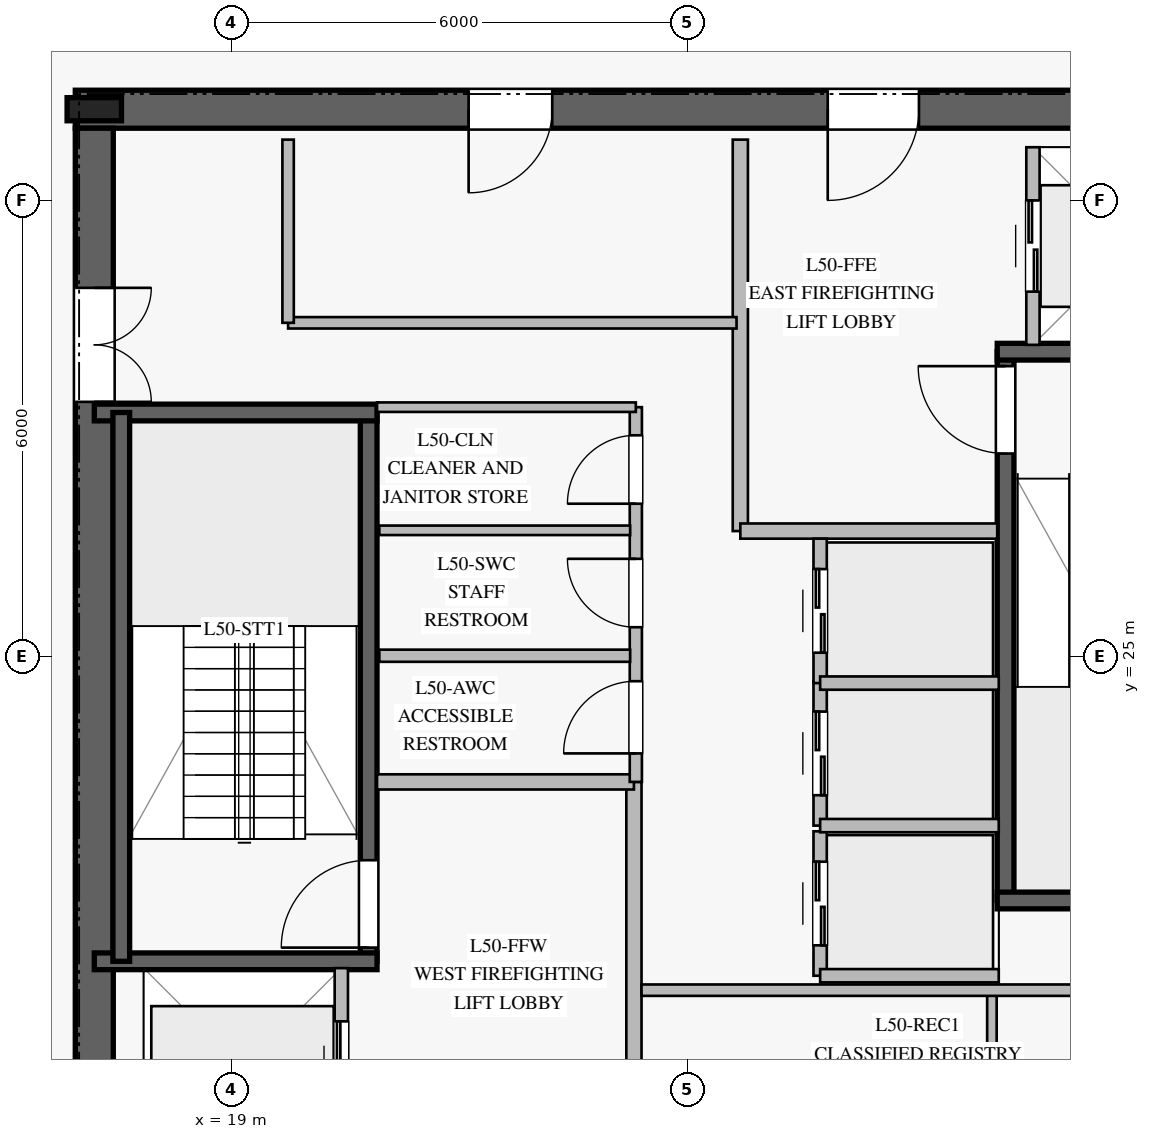
"""IFC4 building model, lengths in metres.
Left out: names, types, materials, properties, quantities, classifications, styles, units other than length and angle.
Written with IfcOpenShell. Run it as: python <this file> out.ifc"""

import sys

from ifc_helpers import new_model, si_unit, direction, frame, frame_2d, origin, origin_2d, place, context, subcontext, project, spatial, rectangle, i_section, extrude, element, fill, save


model = new_model("IFC4")
c1 = context("Model", 3, precision=1e-05, world=origin(), true_north=direction((0.0, 1.0)))
c2 = subcontext(c1, "Body", "Model", "MODEL_VIEW")
j1 = project(units=[si_unit("LENGTHUNIT", "METRE"), si_unit("PLANEANGLEUNIT", "RADIAN")], contexts=[c1])
p1 = place(None, origin())
s1 = spatial("IfcSite", under=j1, at=p1, CompositionType="ELEMENT")
p2 = place(p1, origin())
s2 = spatial("IfcBuilding", under=s1, at=p2, CompositionType="ELEMENT")
p3 = place(p2, frame((0.0, 0.0, 208.8)))
s3 = spatial("IfcBuildingStorey", under=s2, at=p3, CompositionType="ELEMENT", Elevation=208.8)
p4 = place(p3, frame((33.05, 32.2, 0.0), z_axis=(0.0, 0.0, 1.0), x_axis=(-1.0, 0.0, 0.0)))
e1 = element("IfcWall", 1, at=p4, inside=s3, PredefinedType="SHEAR", context=c2, shape_type="SweptSolid", body=[
    extrude(rectangle(XDim=16.1, YDim=0.5, at=frame_2d((8.05, 0.0))), origin(), (0.0, 0.0, 1.0), 3.78),
])
p5 = place(p4, frame((5.0, 0.0, 0.0)))
e2 = element("IfcOpeningElement", 2, at=p5, cuts=e1, PredefinedType="OPENING", context=c2, shape_type="SweptSolid", body=[
    extrude(rectangle(XDim=1.2, YDim=2.25, at=frame_2d((0.6, 1.125))), frame((0.0, 0.26, 0.0), z_axis=(0.0, -1.0, 0.0), x_axis=(1.0, 0.0, 0.0)), (0.0, 0.0, 1.0), 0.52),
])
p6 = place(p4, frame((9.825, 0.0, 0.0)))
e3 = element("IfcOpeningElement", 3, at=p6, cuts=e1, PredefinedType="OPENING", context=c2, shape_type="SweptSolid", body=[
    extrude(rectangle(XDim=1.1, YDim=2.2, at=frame_2d((0.55, 1.1))), frame((0.0, 0.26, 0.0), z_axis=(0.0, -1.0, 0.0), x_axis=(1.0, 0.0, 0.0)), (0.0, 0.0, 1.0), 0.52),
])
p7 = place(p3, frame((17.2, 31.95, 0.0), z_axis=(0.0, 0.0, 1.0), x_axis=(0.0, -1.0, 0.0)))
e4 = element("IfcWall", 4, at=p7, inside=s3, PredefinedType="SHEAR", context=c2, shape_type="SweptSolid", body=[
    extrude(rectangle(XDim=13.9, YDim=0.5, at=frame_2d((6.95, 0.0))), origin(), (0.0, 0.0, 1.0), 3.78),
])
p8 = place(p7, frame((2.1, 0.0, 0.0)))
e5 = element("IfcOpeningElement", 5, at=p8, cuts=e4, PredefinedType="OPENING", context=c2, shape_type="SweptSolid", body=[
    extrude(rectangle(XDim=1.5, YDim=2.2, at=frame_2d((0.75, 1.1))), frame((0.0, 0.26, 0.0), z_axis=(0.0, -1.0, 0.0), x_axis=(1.0, 0.0, 0.0)), (0.0, 0.0, 1.0), 0.52),
])
p9 = place(p3, frame((17.2, 32.2, 0.0), z_axis=(0.0, 0.0, 1.0), x_axis=(1.0, 0.0, 0.0)))
e6 = element("IfcColumn", 6, at=p9, inside=s3, PredefinedType="COLUMN", context=c2, shape_type="SweptSolid", body=[
    extrude(i_section(OverallWidth=0.304, OverallDepth=0.716, WebThickness=0.021, FlangeThickness=0.04, at=origin_2d()), origin(), (0.0, 0.0, 1.0), 4.0),
])
p10 = place(p3, frame((20.81, 20.99, 0.0), z_axis=(0.0, 0.0, 1.0), x_axis=(0.0, 1.0, 0.0)))
e7 = element("IfcWall", 7, at=p10, inside=s3, PredefinedType="SOLIDWALL", context=c2, shape_type="SweptSolid", body=[
    extrude(rectangle(XDim=7.22, YDim=0.22, at=frame_2d((3.61, 0.0))), origin(), (0.0, 0.0, 1.0), 3.78),
])
p11 = place(p10, frame((0.18, 0.0, 0.0)))
e8 = element("IfcOpeningElement", 8, at=p11, cuts=e7, PredefinedType="OPENING", context=c2, shape_type="SweptSolid", body=[
    extrude(rectangle(XDim=1.15, YDim=2.2, at=frame_2d((0.575, 1.1))), frame((0.0, 0.12, 0.0), z_axis=(0.0, -1.0, 0.0), x_axis=(1.0, 0.0, 0.0)), (0.0, 0.0, 1.0), 0.24),
])
for number, where, z_axis, x_axis in (
    (9, (17.2, 20.99, 0.0), (0.0, 0.0, 1.0), (1.0, 0.0, 0.0)),
    (10, (17.2, 28.21, 0.0), (0.0, 0.0, 1.0), (1.0, 0.0, 0.0)),
):
    element("IfcWall", number, at=place(p3, frame(where, z_axis=z_axis, x_axis=x_axis)), inside=s3, PredefinedType="SOLIDWALL", context=c2, shape_type="SweptSolid", body=[
        extrude(rectangle(XDim=3.72, YDim=0.22, at=frame_2d((1.86, 0.0))), origin(), (0.0, 0.0, 1.0), 3.78),
    ])
p12 = place(p3, frame((17.555, 28.21, 0.0), z_axis=(0.0, 0.0, 1.0), x_axis=(0.0, -1.0, 0.0)))
e11 = element("IfcWall", 11, at=p12, inside=s3, PredefinedType="SOLIDWALL", context=c2, shape_type="SweptSolid", body=[
    extrude(rectangle(XDim=7.22, YDim=0.22, at=frame_2d((3.61, 0.0))), origin(), (0.0, 0.0, 1.0), 3.78),
])
p13 = place(p3, frame((29.19, 21.79, 0.0), z_axis=(0.0, 0.0, 1.0), x_axis=(0.0, 1.0, 0.0)))
e12 = element("IfcWall", 12, at=p13, inside=s3, PredefinedType="SOLIDWALL", context=c2, shape_type="SweptSolid", body=[
    extrude(rectangle(XDim=7.22, YDim=0.22, at=frame_2d((3.61, 0.0))), origin(), (0.0, 0.0, 1.0), 3.78),
])
p14 = place(p13, frame((5.88, 0.0, 0.0)))
e13 = element("IfcOpeningElement", 13, at=p14, cuts=e12, PredefinedType="OPENING", context=c2, shape_type="SweptSolid", body=[
    extrude(rectangle(XDim=1.15, YDim=2.2, at=frame_2d((0.575, 1.1))), frame((0.0, 0.12, 0.0), z_axis=(0.0, -1.0, 0.0), x_axis=(1.0, 0.0, 0.0)), (0.0, 0.0, 1.0), 0.24),
])
for number, where, z_axis, x_axis in (
    (14, (29.08, 21.79, 0.0), (0.0, 0.0, 1.0), (1.0, 0.0, 0.0)),
    (15, (29.08, 29.01, 0.0), (0.0, 0.0, 1.0), (1.0, 0.0, 0.0)),
):
    element("IfcWall", number, at=place(p3, frame(where, z_axis=z_axis, x_axis=x_axis)), inside=s3, PredefinedType="SOLIDWALL", context=c2, shape_type="SweptSolid", body=[
        extrude(rectangle(XDim=3.72, YDim=0.22, at=frame_2d((1.86, 0.0))), origin(), (0.0, 0.0, 1.0), 3.78),
    ])
p15 = place(p3, frame((24.3, 18.2, 0.0), z_axis=(0.0, 0.0, 1.0), x_axis=(0.0, 1.0, 0.0)))
e16 = element("IfcWall", 16, at=p15, inside=s3, PredefinedType="PARTITIONING", context=c2, shape_type="SweptSolid", body=[
    extrude(rectangle(XDim=5.15, YDim=0.2, at=frame_2d((2.575, 0.0))), origin(), (0.0, 0.0, 1.0), 3.78),
])
p16 = place(p3, frame((20.92, 23.35, 0.0), z_axis=(0.0, 0.0, 1.0), x_axis=(1.0, 0.0, 0.0)))
e17 = element("IfcWall", 17, at=p16, inside=s3, PredefinedType="PARTITIONING", context=c2, shape_type="SweptSolid", body=[
    extrude(rectangle(XDim=3.38, YDim=0.2, at=frame_2d((1.69, 0.0))), origin(), (0.0, 0.0, 1.0), 3.78),
])
p17 = place(p3, frame((25.7, 26.65, 0.0), z_axis=(0.0, 0.0, 1.0), x_axis=(0.0, 1.0, 0.0)))
e18 = element("IfcWall", 18, at=p17, inside=s3, PredefinedType="PARTITIONING", context=c2, shape_type="SweptSolid", body=[
    extrude(rectangle(XDim=5.15, YDim=0.2, at=frame_2d((2.575, 0.0))), origin(), (0.0, 0.0, 1.0), 3.78),
])
p18 = place(p3, frame((25.7, 26.65, 0.0), z_axis=(0.0, 0.0, 1.0), x_axis=(1.0, 0.0, 0.0)))
e19 = element("IfcWall", 19, at=p18, inside=s3, PredefinedType="PARTITIONING", context=c2, shape_type="SweptSolid", body=[
    extrude(rectangle(XDim=3.38, YDim=0.2, at=frame_2d((1.69, 0.0))), origin(), (0.0, 0.0, 1.0), 3.78),
])
p19 = place(p3, frame((24.325, 23.35, 0.0), z_axis=(0.0, 0.0, 1.0), x_axis=(0.0, 1.0, 0.0)))
e20 = element("IfcWall", 20, at=p19, inside=s3, PredefinedType="PLUMBINGWALL", context=c2, shape_type="SweptSolid", body=[
    extrude(rectangle(XDim=4.93, YDim=0.16, at=frame_2d((2.465, 0.0))), origin(), (0.0, 0.0, 1.0), 3.78),
])
p20 = place(p19, frame((0.375, 0.0, 0.0)))
e21 = element("IfcOpeningElement", 21, at=p20, cuts=e20, PredefinedType="OPENING", context=c2, shape_type="SweptSolid", body=[
    extrude(rectangle(XDim=0.95, YDim=2.1, at=frame_2d((0.475, 1.05))), frame((0.0, 0.09, 0.0), z_axis=(0.0, -1.0, 0.0), x_axis=(1.0, 0.0, 0.0)), (0.0, 0.0, 1.0), 0.18),
])
p21 = place(p19, frame((2.035, 0.0, 0.0)))
e22 = element("IfcOpeningElement", 22, at=p21, cuts=e20, PredefinedType="OPENING", context=c2, shape_type="SweptSolid", body=[
    extrude(rectangle(XDim=0.9, YDim=2.1, at=frame_2d((0.45, 1.05))), frame((0.0, 0.09, 0.0), z_axis=(0.0, -1.0, 0.0), x_axis=(1.0, 0.0, 0.0)), (0.0, 0.0, 1.0), 0.18),
])
p22 = place(p19, frame((3.66, 0.0, 0.0)))
e23 = element("IfcOpeningElement", 23, at=p22, cuts=e20, PredefinedType="OPENING", context=c2, shape_type="SweptSolid", body=[
    extrude(rectangle(XDim=0.9, YDim=2.1, at=frame_2d((0.45, 1.05))), frame((0.0, 0.09, 0.0), z_axis=(0.0, -1.0, 0.0), x_axis=(1.0, 0.0, 0.0)), (0.0, 0.0, 1.0), 0.18),
])
p23 = place(p3, frame((20.92, 28.28, 0.0), z_axis=(0.0, 0.0, 1.0), x_axis=(1.0, 0.0, 0.0)))
e24 = element("IfcWall", 24, at=p23, inside=s3, PredefinedType="PARTITIONING", context=c2, shape_type="SweptSolid", body=[
    extrude(rectangle(XDim=3.405, YDim=0.125, at=frame_2d((1.703, 0.0))), origin(), (0.0, 0.0, 1.0), 3.78),
])
p24 = place(p3, frame((29.01, 18.05, 0.0), z_axis=(0.0, 0.0, 1.0), x_axis=(0.0, 1.0, 0.0)))
e25 = element("IfcWall", 25, at=p24, inside=s3, PredefinedType="PARTITIONING", context=c2, shape_type="SweptSolid", body=[
    extrude(rectangle(XDim=2.5, YDim=0.125, at=frame_2d((1.25, 0.0))), origin(), (0.0, 0.0, 1.0), 3.78),
])
p25 = place(p3, frame((20.95, 25.01, 0.0), z_axis=(0.0, 0.0, 1.0), x_axis=(1.0, 0.0, 0.0)))
e26 = element("IfcWall", 26, at=p25, inside=s3, PredefinedType="PLUMBINGWALL", context=c2, shape_type="SweptSolid", body=[
    extrude(rectangle(XDim=3.3, YDim=0.16, at=frame_2d((1.65, 0.0))), origin(), (0.0, 0.0, 1.0), 3.78),
])
p26 = place(p3, frame((20.95, 26.66, 0.0), z_axis=(0.0, 0.0, 1.0), x_axis=(1.0, 0.0, 0.0)))
e27 = element("IfcWall", 27, at=p26, inside=s3, PredefinedType="PARTITIONING", context=c2, shape_type="SweptSolid", body=[
    extrude(rectangle(XDim=3.3, YDim=0.125, at=frame_2d((1.65, 0.0))), origin(), (0.0, 0.0, 1.0), 3.78),
])
p27 = place(p3, frame((24.4, 20.61, 0.0), z_axis=(0.0, 0.0, 1.0), x_axis=(1.0, 0.0, 0.0)))
e28 = element("IfcWall", 28, at=p27, inside=s3, PredefinedType="PARTITIONING", context=c2, shape_type="SweptSolid", body=[
    extrude(rectangle(XDim=5.9, YDim=0.15, at=frame_2d((2.95, 0.0))), origin(), (0.0, 0.0, 1.0), 3.78),
])
p28 = place(p3, frame((19.75, 29.39, 0.0), z_axis=(0.0, 0.0, 1.0), x_axis=(1.0, 0.0, 0.0)))
e29 = element("IfcWall", 29, at=p28, inside=s3, PredefinedType="PARTITIONING", context=c2, shape_type="SweptSolid", body=[
    extrude(rectangle(XDim=5.9, YDim=0.15, at=frame_2d((2.95, 0.0))), origin(), (0.0, 0.0, 1.0), 3.78),
])
p29 = place(p3, frame((19.75, 29.39, 0.0), z_axis=(0.0, 0.0, 1.0), x_axis=(0.0, 1.0, 0.0)))
e30 = element("IfcWall", 30, at=p29, inside=s3, PredefinedType="PARTITIONING", context=c2, shape_type="SweptSolid", body=[
    extrude(rectangle(XDim=2.41, YDim=0.15, at=frame_2d((1.205, 0.0))), origin(), (0.0, 0.0, 1.0), 3.78),
])
p30 = place(p3, frame((26.75, 20.8, 0.0), z_axis=(0.0, 0.0, 1.0), x_axis=(0.0, 1.0, 0.0)))
e31 = element("IfcWall", 31, at=p30, inside=s3, PredefinedType="PARTITIONING", context=c2, shape_type="SweptSolid", body=[
    extrude(rectangle(XDim=1.9, YDim=0.175, at=frame_2d((0.95, 0.0))), origin(), (0.0, 0.0, 1.0), 3.78),
])
p31 = place(p30, frame((0.4, 0.0, 0.0)))
e32 = element("IfcOpeningElement", 32, at=p31, cuts=e31, PredefinedType="OPENING", context=c2, shape_type="SweptSolid", body=[
    extrude(rectangle(XDim=1.1, YDim=2.2, at=frame_2d((0.55, 1.1))), frame((0.0, 0.098, 0.0), z_axis=(0.0, -1.0, 0.0), x_axis=(1.0, 0.0, 0.0)), (0.0, 0.0, 1.0), 0.195),
])
p32 = place(p3, frame((26.75, 20.8, 0.0), z_axis=(0.0, 0.0, 1.0), x_axis=(1.0, 0.0, 0.0)))
e33 = element("IfcWall", 33, at=p32, inside=s3, PredefinedType="PARTITIONING", context=c2, shape_type="SweptSolid", body=[
    extrude(rectangle(XDim=2.35, YDim=0.175, at=frame_2d((1.175, 0.0))), origin(), (0.0, 0.0, 1.0), 3.78),
])
p33 = place(p3, frame((26.75, 22.775, 0.0), z_axis=(0.0, 0.0, 1.0), x_axis=(0.0, 1.0, 0.0)))
e34 = element("IfcWall", 34, at=p33, inside=s3, PredefinedType="PARTITIONING", context=c2, shape_type="SweptSolid", body=[
    extrude(rectangle(XDim=1.9, YDim=0.175, at=frame_2d((0.95, 0.0))), origin(), (0.0, 0.0, 1.0), 3.78),
])
p34 = place(p33, frame((0.4, 0.0, 0.0)))
e35 = element("IfcOpeningElement", 35, at=p34, cuts=e34, PredefinedType="OPENING", context=c2, shape_type="SweptSolid", body=[
    extrude(rectangle(XDim=1.1, YDim=2.2, at=frame_2d((0.55, 1.1))), frame((0.0, 0.098, 0.0), z_axis=(0.0, -1.0, 0.0), x_axis=(1.0, 0.0, 0.0)), (0.0, 0.0, 1.0), 0.195),
])
p35 = place(p3, frame((26.75, 22.775, 0.0), z_axis=(0.0, 0.0, 1.0), x_axis=(1.0, 0.0, 0.0)))
e36 = element("IfcWall", 36, at=p35, inside=s3, PredefinedType="PARTITIONING", context=c2, shape_type="SweptSolid", body=[
    extrude(rectangle(XDim=2.35, YDim=0.175, at=frame_2d((1.175, 0.0))), origin(), (0.0, 0.0, 1.0), 3.78),
])
p36 = place(p3, frame((26.75, 24.65, 0.0), z_axis=(0.0, 0.0, 1.0), x_axis=(0.0, 1.0, 0.0)))
e37 = element("IfcWall", 37, at=p36, inside=s3, PredefinedType="PARTITIONING", context=c2, shape_type="SweptSolid", body=[
    extrude(rectangle(XDim=1.9, YDim=0.175, at=frame_2d((0.95, 0.0))), origin(), (0.0, 0.0, 1.0), 3.78),
])
p37 = place(p36, frame((0.4, 0.0, 0.0)))
e38 = element("IfcOpeningElement", 38, at=p37, cuts=e37, PredefinedType="OPENING", context=c2, shape_type="SweptSolid", body=[
    extrude(rectangle(XDim=1.1, YDim=2.2, at=frame_2d((0.55, 1.1))), frame((0.0, 0.098, 0.0), z_axis=(0.0, -1.0, 0.0), x_axis=(1.0, 0.0, 0.0)), (0.0, 0.0, 1.0), 0.195),
])
p38 = place(p3, frame((26.75, 24.65, 0.0), z_axis=(0.0, 0.0, 1.0), x_axis=(1.0, 0.0, 0.0)))
e39 = element("IfcWall", 39, at=p38, inside=s3, PredefinedType="PARTITIONING", context=c2, shape_type="SweptSolid", body=[
    extrude(rectangle(XDim=2.35, YDim=0.175, at=frame_2d((1.175, 0.0))), origin(), (0.0, 0.0, 1.0), 3.78),
])
p39 = place(p3, frame((20.45, 18.3, 0.0), z_axis=(0.0, 0.0, 1.0), x_axis=(0.0, 1.0, 0.0)))
e40 = element("IfcWall", 40, at=p39, inside=s3, PredefinedType="PARTITIONING", context=c2, shape_type="SweptSolid", body=[
    extrude(rectangle(XDim=2.6, YDim=0.175, at=frame_2d((1.3, 0.0))), origin(), (0.0, 0.0, 1.0), 3.78),
])
p40 = place(p39, frame((0.7, 0.0, 0.0)))
e41 = element("IfcOpeningElement", 41, at=p40, cuts=e40, PredefinedType="OPENING", context=c2, shape_type="SweptSolid", body=[
    extrude(rectangle(XDim=1.2, YDim=2.2, at=frame_2d((0.6, 1.1))), frame((0.0, 0.098, 0.0), z_axis=(0.0, -1.0, 0.0), x_axis=(1.0, 0.0, 0.0)), (0.0, 0.0, 1.0), 0.195),
])
p41 = place(p3, frame((29.55, 29.1, 0.0), z_axis=(0.0, 0.0, 1.0), x_axis=(0.0, 1.0, 0.0)))
e42 = element("IfcWall", 42, at=p41, inside=s3, PredefinedType="PARTITIONING", context=c2, shape_type="SweptSolid", body=[
    extrude(rectangle(XDim=2.6, YDim=0.175, at=frame_2d((1.3, 0.0))), origin(), (0.0, 0.0, 1.0), 3.78),
])
p42 = place(p41, frame((0.7, 0.0, 0.0)))
e43 = element("IfcOpeningElement", 43, at=p42, cuts=e42, PredefinedType="OPENING", context=c2, shape_type="SweptSolid", body=[
    extrude(rectangle(XDim=1.2, YDim=2.2, at=frame_2d((0.6, 1.1))), frame((0.0, 0.098, 0.0), z_axis=(0.0, -1.0, 0.0), x_axis=(1.0, 0.0, 0.0)), (0.0, 0.0, 1.0), 0.195),
])
p43 = place(p11, origin())
e44 = element("IfcDoor", 44, at=p43, inside=s3, OperationType="SINGLE_SWING_LEFT", PredefinedType="DOOR", context=c2, shape_type="SweptSolid", body=[
    extrude(rectangle(XDim=1.15, YDim=2.2, at=frame_2d((0.575, 1.1))), frame((0.0, 0.025, 0.0), z_axis=(0.0, -1.0, 0.0), x_axis=(1.0, 0.0, 0.0)), (0.0, 0.0, 1.0), 0.05),
])
fill(e8, e44)
p44 = place(p14, origin())
e45 = element("IfcDoor", 45, at=p44, inside=s3, OperationType="SINGLE_SWING_RIGHT", PredefinedType="DOOR", context=c2, shape_type="SweptSolid", body=[
    extrude(rectangle(XDim=1.15, YDim=2.2, at=frame_2d((0.575, 1.1))), frame((0.0, 0.025, 0.0), z_axis=(0.0, -1.0, 0.0), x_axis=(1.0, 0.0, 0.0)), (0.0, 0.0, 1.0), 0.05),
])
fill(e13, e45)
p45 = place(p5, origin())
e46 = element("IfcDoor", 46, at=p45, inside=s3, OperationType="SINGLE_SWING_RIGHT", PredefinedType="DOOR", context=c2, shape_type="SweptSolid", body=[
    extrude(rectangle(XDim=1.2, YDim=2.25, at=frame_2d((0.6, 1.125))), frame((0.0, 0.025, 0.0), z_axis=(0.0, -1.0, 0.0), x_axis=(1.0, 0.0, 0.0)), (0.0, 0.0, 1.0), 0.05),
])
fill(e2, e46)
p46 = place(p8, origin())
e47 = element("IfcDoor", 47, at=p46, inside=s3, OperationType="DOUBLE_DOOR_SINGLE_SWING", PredefinedType="DOOR", context=c2, shape_type="SweptSolid", body=[
    extrude(rectangle(XDim=1.5, YDim=2.2, at=frame_2d((0.75, 1.1))), frame((0.0, 0.025, 0.0), z_axis=(0.0, -1.0, 0.0), x_axis=(1.0, 0.0, 0.0)), (0.0, 0.0, 1.0), 0.05),
])
fill(e5, e47)
p47 = place(p20, origin())
e48 = element("IfcDoor", 48, at=p47, inside=s3, OperationType="SINGLE_SWING_LEFT", PredefinedType="DOOR", context=c2, shape_type="SweptSolid", body=[
    extrude(rectangle(XDim=0.95, YDim=2.1, at=frame_2d((0.475, 1.05))), frame((0.0, 0.025, 0.0), z_axis=(0.0, -1.0, 0.0), x_axis=(1.0, 0.0, 0.0)), (0.0, 0.0, 1.0), 0.05),
])
fill(e21, e48)
p48 = place(p21, origin())
e49 = element("IfcDoor", 49, at=p48, inside=s3, OperationType="SINGLE_SWING_RIGHT", PredefinedType="DOOR", context=c2, shape_type="SweptSolid", body=[
    extrude(rectangle(XDim=0.9, YDim=2.1, at=frame_2d((0.45, 1.05))), frame((0.0, 0.025, 0.0), z_axis=(0.0, -1.0, 0.0), x_axis=(1.0, 0.0, 0.0)), (0.0, 0.0, 1.0), 0.05),
])
fill(e22, e49)
p49 = place(p22, origin())
e50 = element("IfcDoor", 50, at=p49, inside=s3, OperationType="SINGLE_SWING_LEFT", PredefinedType="DOOR", context=c2, shape_type="SweptSolid", body=[
    extrude(rectangle(XDim=0.9, YDim=2.1, at=frame_2d((0.45, 1.05))), frame((0.0, 0.025, 0.0), z_axis=(0.0, -1.0, 0.0), x_axis=(1.0, 0.0, 0.0)), (0.0, 0.0, 1.0), 0.05),
])
fill(e23, e50)
p50 = place(p6, origin())
e51 = element("IfcDoor", 51, at=p50, inside=s3, OperationType="SINGLE_SWING_RIGHT", PredefinedType="DOOR", context=c2, shape_type="SweptSolid", body=[
    extrude(rectangle(XDim=1.1, YDim=2.2, at=frame_2d((0.55, 1.1))), frame((0.0, 0.025, 0.0), z_axis=(0.0, -1.0, 0.0), x_axis=(1.0, 0.0, 0.0)), (0.0, 0.0, 1.0), 0.05),
])
fill(e3, e51)
p51 = place(p31, origin())
e52 = element("IfcDoor", 52, at=p51, inside=s3, OperationType="DOUBLE_DOOR_SLIDING", PredefinedType="DOOR", context=c2, shape_type="SweptSolid", body=[
    extrude(rectangle(XDim=1.1, YDim=2.2, at=frame_2d((0.55, 1.1))), frame((0.0, 0.025, 0.0), z_axis=(0.0, -1.0, 0.0), x_axis=(1.0, 0.0, 0.0)), (0.0, 0.0, 1.0), 0.05),
])
fill(e32, e52)
p52 = place(p34, origin())
e53 = element("IfcDoor", 53, at=p52, inside=s3, OperationType="DOUBLE_DOOR_SLIDING", PredefinedType="DOOR", context=c2, shape_type="SweptSolid", body=[
    extrude(rectangle(XDim=1.1, YDim=2.2, at=frame_2d((0.55, 1.1))), frame((0.0, 0.025, 0.0), z_axis=(0.0, -1.0, 0.0), x_axis=(1.0, 0.0, 0.0)), (0.0, 0.0, 1.0), 0.05),
])
fill(e35, e53)
p53 = place(p37, origin())
e54 = element("IfcDoor", 54, at=p53, inside=s3, OperationType="DOUBLE_DOOR_SLIDING", PredefinedType="DOOR", context=c2, shape_type="SweptSolid", body=[
    extrude(rectangle(XDim=1.1, YDim=2.2, at=frame_2d((0.55, 1.1))), frame((0.0, 0.025, 0.0), z_axis=(0.0, -1.0, 0.0), x_axis=(1.0, 0.0, 0.0)), (0.0, 0.0, 1.0), 0.05),
])
fill(e38, e54)
p54 = place(p40, origin())
e55 = element("IfcDoor", 55, at=p54, inside=s3, OperationType="DOUBLE_DOOR_SLIDING", PredefinedType="DOOR", context=c2, shape_type="SweptSolid", body=[
    extrude(rectangle(XDim=1.2, YDim=2.2, at=frame_2d((0.6, 1.1))), frame((0.0, 0.025, 0.0), z_axis=(0.0, -1.0, 0.0), x_axis=(1.0, 0.0, 0.0)), (0.0, 0.0, 1.0), 0.05),
])
fill(e41, e55)
p55 = place(p42, origin())
e56 = element("IfcDoor", 56, at=p55, inside=s3, OperationType="DOUBLE_DOOR_SLIDING", PredefinedType="DOOR", context=c2, shape_type="SweptSolid", body=[
    extrude(rectangle(XDim=1.2, YDim=2.2, at=frame_2d((0.6, 1.1))), frame((0.0, 0.025, 0.0), z_axis=(0.0, -1.0, 0.0), x_axis=(1.0, 0.0, 0.0)), (0.0, 0.0, 1.0), 0.05),
])
fill(e43, e56)
save(model, sys.argv[1])
